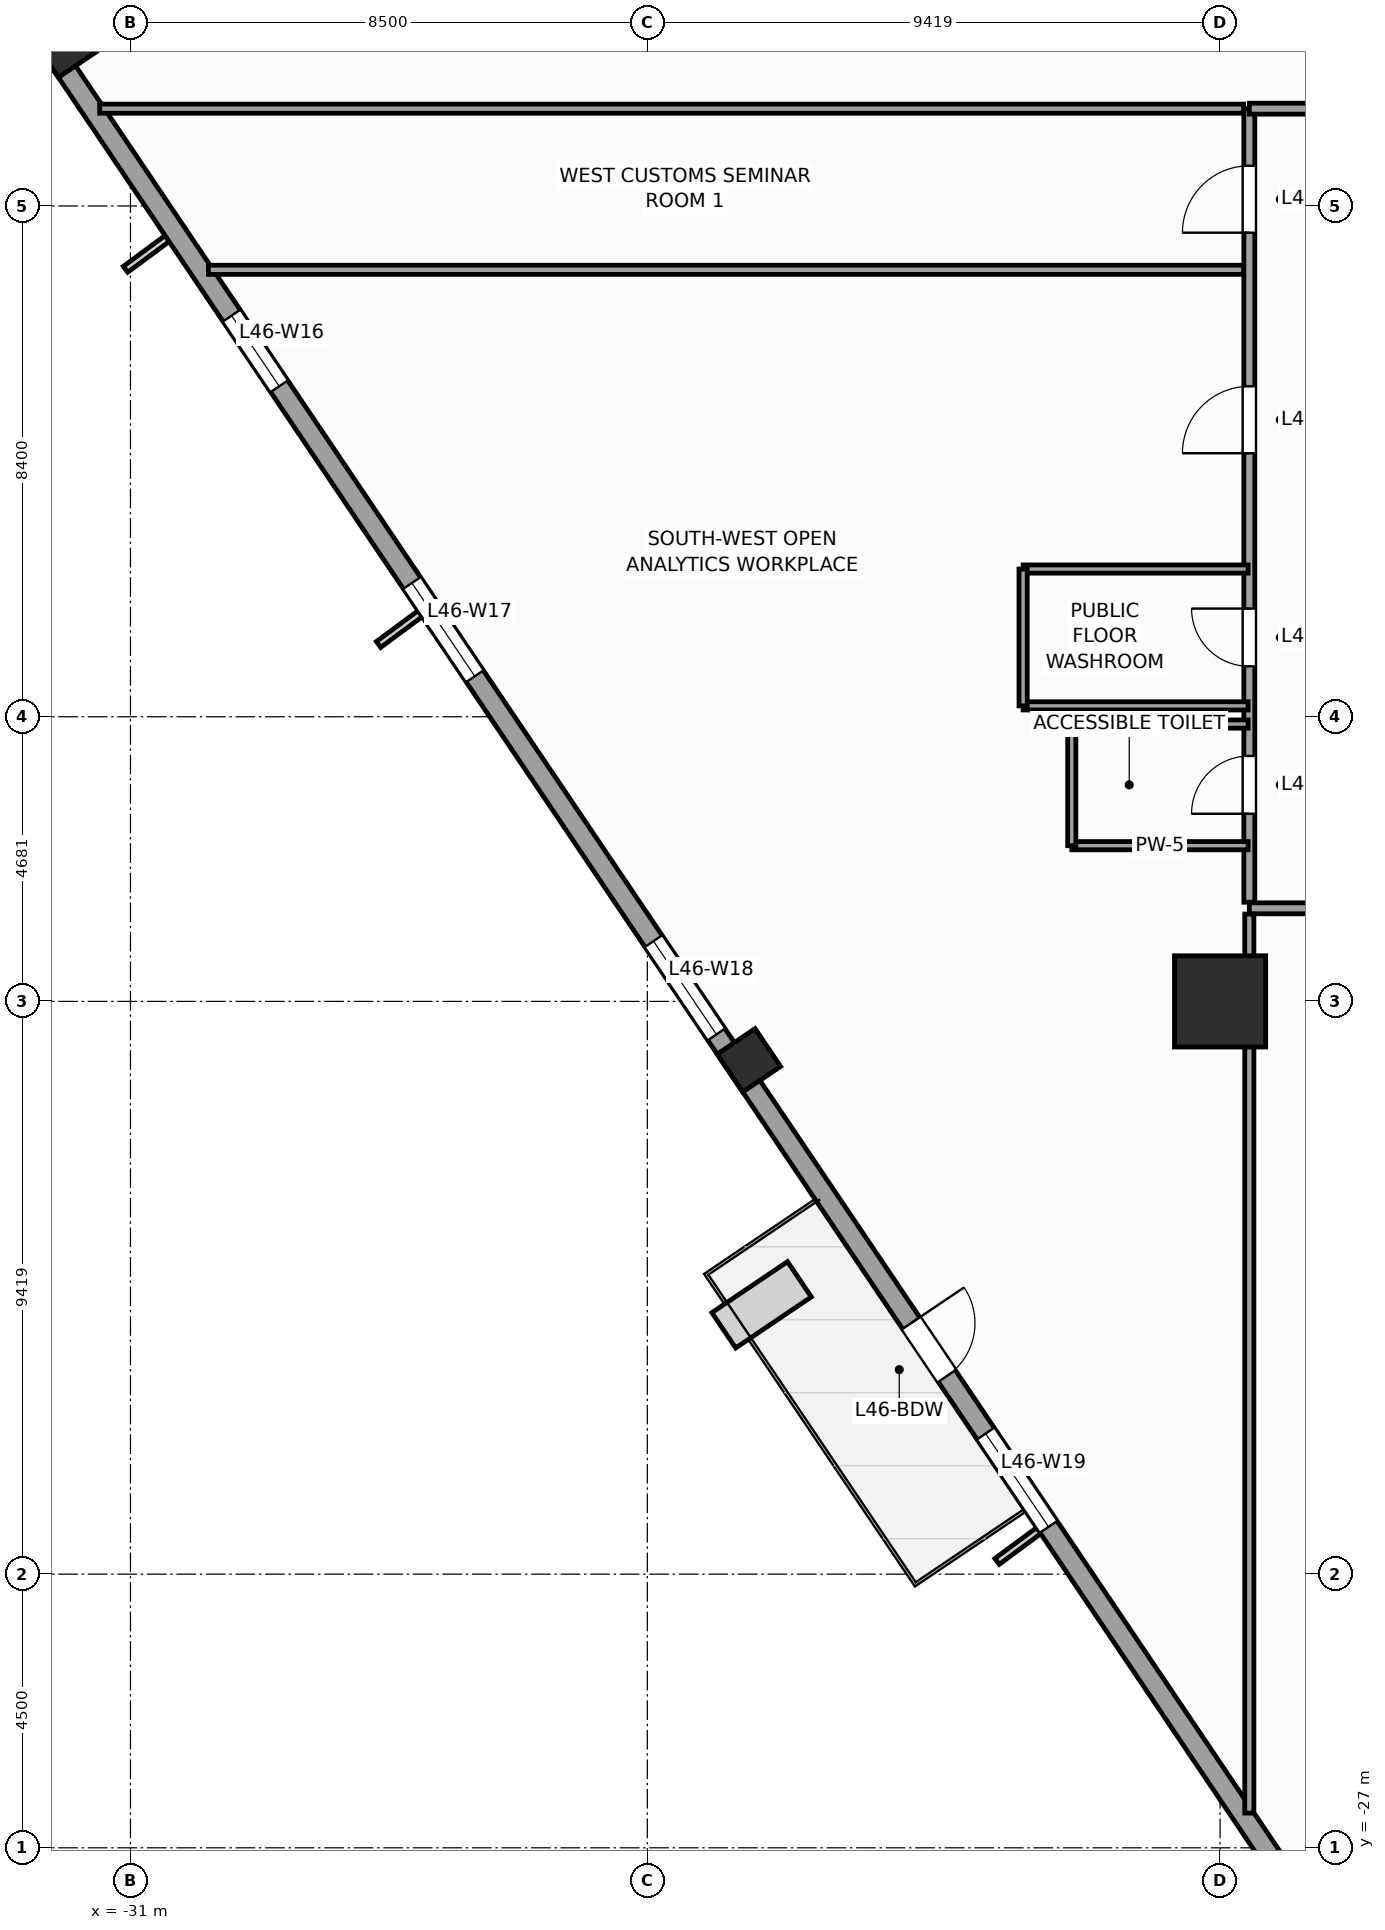
"""IFC4 building model, lengths in metres.
Left out: names, types, materials, properties, quantities, classifications, styles, units other than length and angle.
Written with IfcOpenShell. Run it as: python <this file> out.ifc"""

import sys

from ifc_helpers import new_model, si_unit, direction, frame, frame_2d, origin, origin_2d, place, context, subcontext, project, spatial, rectangle, extrude, source, transform, mapped, element, fill, save


model = new_model("IFC4")
c1 = context("Model", 3, precision=1e-05, world=origin(), true_north=direction((0.0, 1.0)))
c2 = subcontext(c1, "Body", "Model", "MODEL_VIEW")
j1 = project(units=[si_unit("LENGTHUNIT", "METRE"), si_unit("PLANEANGLEUNIT", "RADIAN")], contexts=[c1])
p1 = place(None, origin())
s1 = spatial("IfcSite", under=j1, at=p1, CompositionType="ELEMENT")
p2 = place(p1, origin())
s2 = spatial("IfcBuilding", under=s1, at=p2, CompositionType="ELEMENT")
p3 = place(p2, frame((0.0, 0.0, 192.4)))
s3 = spatial("IfcBuildingStorey", under=s2, at=p3, CompositionType="ELEMENT", Elevation=192.4)
m1 = source(origin(), c2, "Body", "SweptSolid", [
    extrude(rectangle(XDim=1.5, YDim=1.5, at=origin_2d()), origin(), (0.0, 0.0, 1.0), 4.0),
])
p4 = place(p3, frame((-13.081, -13.081, 0.0), z_axis=(0.0, 0.0, 1.0), x_axis=(1.0, 0.0, 0.0)))
e1 = element("IfcColumn", 1, at=p4, inside=s3, PredefinedType="COLUMN", context=c2, shape_type="MappedRepresentation", body=[
    mapped(m1, transform((0.0, 0.0, 0.0), scale=1.0)),
])
m2 = source(origin(), c2, "Body", "SweptSolid", [
    extrude(rectangle(XDim=0.75, YDim=0.75, at=origin_2d()), origin(), (0.0, 0.0, 1.0), 4.0),
])
for number, where, z_axis, x_axis in (
    (2, (-32.083, 2.635, 0.0), (0.0, 0.0, 1.0), (0.829, 0.559, 0.0)),
    (3, (-20.83, -14.05, 0.0), (0.0, 0.0, 1.0), (0.829, 0.559, 0.0)),
):
    element("IfcColumn", number, at=place(p3, frame(where, z_axis=z_axis, x_axis=x_axis)), inside=s3, PredefinedType="COLUMN", context=c2, shape_type="MappedRepresentation", body=[
        mapped(m2, transform((0.0, 0.0, 0.0), scale=1.0)),
    ])
p5 = place(p3, frame((-28.223, 5.486, 0.0), z_axis=(0.0, 0.0, 1.0), x_axis=(-0.82905227345, -0.559171107879, 0.0)))
e4 = element("IfcWall", 4, at=p5, inside=s3, PredefinedType="STANDARD", context=c2, shape_type="SweptSolid", body=[
    extrude(rectangle(XDim=5.17, YDim=0.34, at=frame_2d((2.585, 0.0))), origin(), (0.0, 0.0, 1.0), 3.04),
])
p6 = place(p5, frame((1.885, 0.0, 0.56)))
e5 = element("IfcOpeningElement", 5, at=p6, cuts=e4, PredefinedType="OPENING", context=c2, shape_type="SweptSolid", body=[
    extrude(rectangle(XDim=1.4, YDim=2.4, at=frame_2d((0.7, 1.2))), frame((0.0, 0.18, 0.0), z_axis=(0.0, -1.0, 0.0), x_axis=(1.0, 0.0, 0.0)), (0.0, 0.0, 1.0), 0.36),
])
p7 = place(p3, frame((-32.558, 2.972, 0.0), z_axis=(0.0, 0.0, 1.0), x_axis=(0.559194910251, -0.829036218961, 0.0)))
e6 = element("IfcWall", 6, at=p7, inside=s3, PredefinedType="STANDARD", context=c2, shape_type="SweptSolid", body=[
    extrude(rectangle(XDim=41.34, YDim=0.34, at=frame_2d((20.67, 0.0))), origin(), (0.0, 0.0, 1.0), 3.04),
])
p8 = place(p7, frame((25.745, 0.0, 0.0)))
e7 = element("IfcOpeningElement", 7, at=p8, cuts=e6, PredefinedType="OPENING", context=c2, shape_type="SweptSolid", body=[
    extrude(rectangle(XDim=1.05, YDim=2.25, at=frame_2d((0.525, 1.125))), frame((0.0, 0.18, 0.0), z_axis=(0.0, -1.0, 0.0), x_axis=(1.0, 0.0, 0.0)), (0.0, 0.0, 1.0), 0.36),
])
p9 = place(p7, frame((5.761, 0.0, 0.56)))
e8 = element("IfcOpeningElement", 8, at=p9, cuts=e6, PredefinedType="OPENING", context=c2, shape_type="SweptSolid", body=[
    extrude(rectangle(XDim=1.4, YDim=2.4, at=frame_2d((0.7, 1.2))), frame((0.0, 0.18, 0.0), z_axis=(0.0, -1.0, 0.0), x_axis=(1.0, 0.0, 0.0)), (0.0, 0.0, 1.0), 0.36),
])
p10 = place(p7, frame((11.064, 0.0, 0.61)))
e9 = element("IfcOpeningElement", 9, at=p10, cuts=e6, PredefinedType="OPENING", context=c2, shape_type="SweptSolid", body=[
    extrude(rectangle(XDim=1.85, YDim=2.35, at=frame_2d((0.925, 1.175))), frame((0.0, 0.18, 0.0), z_axis=(0.0, -1.0, 0.0), x_axis=(1.0, 0.0, 0.0)), (0.0, 0.0, 1.0), 0.36),
])
p11 = place(p7, frame((18.168, 0.0, 0.61)))
e10 = element("IfcOpeningElement", 10, at=p11, cuts=e6, PredefinedType="OPENING", context=c2, shape_type="SweptSolid", body=[
    extrude(rectangle(XDim=1.85, YDim=2.35, at=frame_2d((0.925, 1.175))), frame((0.0, 0.18, 0.0), z_axis=(0.0, -1.0, 0.0), x_axis=(1.0, 0.0, 0.0)), (0.0, 0.0, 1.0), 0.36),
])
p12 = place(p7, frame((27.936, 0.0, 0.61)))
e11 = element("IfcOpeningElement", 11, at=p12, cuts=e6, PredefinedType="OPENING", context=c2, shape_type="SweptSolid", body=[
    extrude(rectangle(XDim=1.85, YDim=2.35, at=frame_2d((0.925, 1.175))), frame((0.0, 0.18, 0.0), z_axis=(0.0, -1.0, 0.0), x_axis=(1.0, 0.0, 0.0)), (0.0, 0.0, 1.0), 0.36),
])
p13 = place(p7, frame((36.352, 0.0, 0.56)))
e12 = element("IfcOpeningElement", 12, at=p13, cuts=e6, PredefinedType="OPENING", context=c2, shape_type="SweptSolid", body=[
    extrude(rectangle(XDim=1.4, YDim=2.4, at=frame_2d((0.7, 1.2))), frame((0.0, 0.18, 0.0), z_axis=(0.0, -1.0, 0.0), x_axis=(1.0, 0.0, 0.0)), (0.0, 0.0, 1.0), 0.36),
])
p14 = place(p3, frame((-12.6, -11.55, 0.0), z_axis=(0.0, 0.0, 1.0), x_axis=(1.0, 0.0, 0.0)))
e13 = element("IfcWall", 13, at=p14, inside=s3, PredefinedType="PARTITIONING", context=c2, shape_type="SweptSolid", body=[
    extrude(rectangle(XDim=25.2, YDim=0.18, at=frame_2d((12.6, 0.0))), origin(), (0.0, 0.0, 1.0), 3.74),
])
p15 = place(p14, frame((3.165, 0.0, 0.0)))
e14 = element("IfcOpeningElement", 14, at=p15, cuts=e13, PredefinedType="OPENING", context=c2, shape_type="SweptSolid", body=[
    extrude(rectangle(XDim=1.1, YDim=2.2, at=frame_2d((0.55, 1.1))), frame((0.0, 0.1, 0.0), z_axis=(0.0, -1.0, 0.0), x_axis=(1.0, 0.0, 0.0)), (0.0, 0.0, 1.0), 0.2),
])
p16 = place(p14, frame((9.3, 0.0, 0.0)))
e15 = element("IfcOpeningElement", 15, at=p16, cuts=e13, PredefinedType="OPENING", context=c2, shape_type="SweptSolid", body=[
    extrude(rectangle(XDim=1.1, YDim=2.2, at=frame_2d((0.55, 1.1))), frame((0.0, 0.1, 0.0), z_axis=(0.0, -1.0, 0.0), x_axis=(1.0, 0.0, 0.0)), (0.0, 0.0, 1.0), 0.2),
])
p17 = place(p14, frame((14.8, 0.0, 0.0)))
e16 = element("IfcOpeningElement", 16, at=p17, cuts=e13, PredefinedType="OPENING", context=c2, shape_type="SweptSolid", body=[
    extrude(rectangle(XDim=1.1, YDim=2.2, at=frame_2d((0.55, 1.1))), frame((0.0, 0.1, 0.0), z_axis=(0.0, -1.0, 0.0), x_axis=(1.0, 0.0, 0.0)), (0.0, 0.0, 1.0), 0.2),
])
p18 = place(p14, frame((20.936, 0.0, 0.0)))
e17 = element("IfcOpeningElement", 17, at=p18, cuts=e13, PredefinedType="OPENING", context=c2, shape_type="SweptSolid", body=[
    extrude(rectangle(XDim=1.1, YDim=2.2, at=frame_2d((0.55, 1.1))), frame((0.0, 0.1, 0.0), z_axis=(0.0, -1.0, 0.0), x_axis=(1.0, 0.0, 0.0)), (0.0, 0.0, 1.0), 0.2),
])
p19 = place(p3, frame((-12.6, -11.45, 0.0), z_axis=(0.0, 0.0, 1.0), x_axis=(0.0, 1.0, 0.0)))
e18 = element("IfcWall", 18, at=p19, inside=s3, PredefinedType="PARTITIONING", context=c2, shape_type="SweptSolid", body=[
    extrude(rectangle(XDim=13.05, YDim=0.18, at=frame_2d((6.525, 0.0))), origin(), (0.0, 0.0, 1.0), 3.74),
])
p20 = place(p19, frame((1.455, 0.0, 0.0)))
e19 = element("IfcOpeningElement", 19, at=p20, cuts=e18, PredefinedType="OPENING", context=c2, shape_type="SweptSolid", body=[
    extrude(rectangle(XDim=0.95, YDim=2.1, at=frame_2d((0.475, 1.05))), frame((0.0, 0.1, 0.0), z_axis=(0.0, -1.0, 0.0), x_axis=(1.0, 0.0, 0.0)), (0.0, 0.0, 1.0), 0.2),
])
p21 = place(p19, frame((3.879, 0.0, 0.0)))
e20 = element("IfcOpeningElement", 20, at=p21, cuts=e18, PredefinedType="OPENING", context=c2, shape_type="SweptSolid", body=[
    extrude(rectangle(XDim=0.95, YDim=2.1, at=frame_2d((0.475, 1.05))), frame((0.0, 0.1, 0.0), z_axis=(0.0, -1.0, 0.0), x_axis=(1.0, 0.0, 0.0)), (0.0, 0.0, 1.0), 0.2),
])
p22 = place(p19, frame((11.01, 0.0, 0.0)))
e21 = element("IfcOpeningElement", 21, at=p22, cuts=e18, PredefinedType="OPENING", context=c2, shape_type="SweptSolid", body=[
    extrude(rectangle(XDim=1.1, YDim=2.2, at=frame_2d((0.55, 1.1))), frame((0.0, 0.1, 0.0), z_axis=(0.0, -1.0, 0.0), x_axis=(1.0, 0.0, 0.0)), (0.0, 0.0, 1.0), 0.2),
])
p23 = place(p19, frame((7.384, 0.0, 0.0)))
e22 = element("IfcOpeningElement", 22, at=p23, cuts=e18, PredefinedType="OPENING", context=c2, shape_type="SweptSolid", body=[
    extrude(rectangle(XDim=1.1, YDim=2.2, at=frame_2d((0.55, 1.1))), frame((0.0, 0.1, 0.0), z_axis=(0.0, -1.0, 0.0), x_axis=(1.0, 0.0, 0.0)), (0.0, 0.0, 1.0), 0.2),
])
p24 = place(p3, frame((-12.6, 1.6, 0.0), z_axis=(0.0, 0.0, 1.0), x_axis=(1.0, 0.0, 0.0)))
e23 = element("IfcWall", 23, at=p24, inside=s3, PredefinedType="PARTITIONING", context=c2, shape_type="SweptSolid", body=[
    extrude(rectangle(XDim=3.9, YDim=0.18, at=frame_2d((1.95, 0.0))), origin(), (0.0, 0.0, 1.0), 3.74),
])
p25 = place(p24, frame((1.4, 0.0, 0.0)))
e24 = element("IfcOpeningElement", 24, at=p25, cuts=e23, PredefinedType="OPENING", context=c2, shape_type="SweptSolid", body=[
    extrude(rectangle(XDim=1.1, YDim=2.2, at=frame_2d((0.55, 1.1))), frame((0.0, 0.1, 0.0), z_axis=(0.0, -1.0, 0.0), x_axis=(1.0, 0.0, 0.0)), (0.0, 0.0, 1.0), 0.2),
])
p26 = place(p3, frame((-29.719, -1.05, 0.0), z_axis=(0.0, 0.0, 1.0), x_axis=(1.0, 0.0, 0.0)))
e25 = element("IfcWall", 25, at=p26, inside=s3, PredefinedType="PARTITIONING", context=c2, shape_type="SweptSolid", body=[
    extrude(rectangle(XDim=17.023, YDim=0.15, at=frame_2d((8.512, 0.0))), origin(), (0.0, 0.0, 1.0), 3.74),
])
p27 = place(p3, frame((-31.506, 1.6, 0.0), z_axis=(0.0, 0.0, 1.0), x_axis=(1.0, 0.0, 0.0)))
e26 = element("IfcWall", 26, at=p27, inside=s3, PredefinedType="PARTITIONING", context=c2, shape_type="SweptSolid", body=[
    extrude(rectangle(XDim=18.811, YDim=0.15, at=frame_2d((9.406, 0.0))), origin(), (0.0, 0.0, 1.0), 3.74),
])
p28 = place(p3, frame((-12.6, -26.429, 0.0), z_axis=(0.0, 0.0, 1.0), x_axis=(0.0, 1.0, 0.0)))
e27 = element("IfcWall", 27, at=p28, inside=s3, PredefinedType="PARTITIONING", context=c2, shape_type="SweptSolid", body=[
    extrude(rectangle(XDim=14.784, YDim=0.15, at=frame_2d((7.392, 0.0))), origin(), (0.0, 0.0, 1.0), 3.04),
])
for number, where, z_axis, x_axis in (
    (28, (-15.52, -10.52, 0.0), (0.0, 0.0, 1.0), (1.0, 0.0, 0.0)),
    (29, (-15.52, -8.52, 0.0), (0.0, 0.0, 1.0), (1.0, 0.0, 0.0)),
):
    element("IfcWall", number, at=place(p3, frame(where, z_axis=z_axis, x_axis=x_axis)), inside=s3, PredefinedType="PARTITIONING", context=c2, shape_type="SweptSolid", body=[
        extrude(rectangle(XDim=2.9, YDim=0.135, at=frame_2d((1.45, 0.0))), origin(), (0.0, 0.0, 1.0), 3.74),
    ])
p29 = place(p3, frame((-15.52, -10.52, 0.0), z_axis=(0.0, 0.0, 1.0), x_axis=(0.0, 1.0, 0.0)))
e30 = element("IfcWall", 30, at=p29, inside=s3, PredefinedType="PARTITIONING", context=c2, shape_type="SweptSolid", body=[
    extrude(rectangle(XDim=2.0, YDim=0.135, at=frame_2d((1.0, 0.0))), origin(), (0.0, 0.0, 1.0), 3.74),
])
for number, where, z_axis, x_axis in (
    (31, (-16.32, -8.221, 0.0), (0.0, 0.0, 1.0), (1.0, 0.0, 0.0)),
    (32, (-16.32, -5.971, 0.0), (0.0, 0.0, 1.0), (1.0, 0.0, 0.0)),
):
    element("IfcWall", number, at=place(p3, frame(where, z_axis=z_axis, x_axis=x_axis)), inside=s3, PredefinedType="PARTITIONING", context=c2, shape_type="SweptSolid", body=[
        extrude(rectangle(XDim=3.7, YDim=0.135, at=frame_2d((1.85, 0.0))), origin(), (0.0, 0.0, 1.0), 3.74),
    ])
p30 = place(p3, frame((-16.32, -8.221, 0.0), z_axis=(0.0, 0.0, 1.0), x_axis=(0.0, 1.0, 0.0)))
e33 = element("IfcWall", 33, at=p30, inside=s3, PredefinedType="PARTITIONING", context=c2, shape_type="SweptSolid", body=[
    extrude(rectangle(XDim=2.25, YDim=0.135, at=frame_2d((1.125, 0.0))), origin(), (0.0, 0.0, 1.0), 3.74),
])
m3 = source(origin(), c2, "Body", "SweptSolid", [
    extrude(rectangle(XDim=1.05, YDim=2.25, at=frame_2d((0.525, 1.125))), frame((0.0, 0.025, 0.0), z_axis=(0.0, -1.0, 0.0), x_axis=(1.0, 0.0, 0.0)), (0.0, 0.0, 1.0), 0.05),
])
p31 = place(p8, origin())
e34 = element("IfcDoor", 34, at=p31, inside=s3, OperationType="SINGLE_SWING_LEFT", PredefinedType="DOOR", context=c2, shape_type="MappedRepresentation", body=[
    mapped(m3, transform((0.0, 0.0, 0.0), scale=1.0)),
])
fill(e7, e34)
m4 = source(origin(), c2, "Body", "SweptSolid", [
    extrude(rectangle(XDim=1.4, YDim=2.4, at=frame_2d((0.7, 1.2))), frame((0.0, 0.03, 0.0), z_axis=(0.0, -1.0, 0.0), x_axis=(1.0, 0.0, 0.0)), (0.0, 0.0, 1.0), 0.06),
])
p32 = place(p9, origin())
e35 = element("IfcWindow", 35, at=p32, inside=s3, PartitioningType="SINGLE_PANEL", PredefinedType="WINDOW", context=c2, shape_type="MappedRepresentation", body=[
    mapped(m4, transform((0.0, 0.0, 0.0), scale=1.0)),
])
fill(e8, e35)
m5 = source(origin(), c2, "Body", "SweptSolid", [
    extrude(rectangle(XDim=1.85, YDim=2.35, at=frame_2d((0.925, 1.175))), frame((0.0, 0.03, 0.0), z_axis=(0.0, -1.0, 0.0), x_axis=(1.0, 0.0, 0.0)), (0.0, 0.0, 1.0), 0.06),
])
p33 = place(p10, origin())
e36 = element("IfcWindow", 36, at=p33, inside=s3, PartitioningType="SINGLE_PANEL", PredefinedType="WINDOW", context=c2, shape_type="MappedRepresentation", body=[
    mapped(m5, transform((0.0, 0.0, 0.0), scale=1.0)),
])
fill(e9, e36)
p34 = place(p11, origin())
e37 = element("IfcWindow", 37, at=p34, inside=s3, PartitioningType="SINGLE_PANEL", PredefinedType="WINDOW", context=c2, shape_type="MappedRepresentation", body=[
    mapped(m5, transform((0.0, 0.0, 0.0), scale=1.0)),
])
fill(e10, e37)
p35 = place(p12, origin())
e38 = element("IfcWindow", 38, at=p35, inside=s3, PartitioningType="SINGLE_PANEL", PredefinedType="WINDOW", context=c2, shape_type="MappedRepresentation", body=[
    mapped(m5, transform((0.0, 0.0, 0.0), scale=1.0)),
])
fill(e11, e38)
m6 = source(origin(), c2, "Body", "SweptSolid", [
    extrude(rectangle(XDim=0.95, YDim=2.1, at=frame_2d((0.475, 1.05))), frame((0.0, 0.025, 0.0), z_axis=(0.0, -1.0, 0.0), x_axis=(1.0, 0.0, 0.0)), (0.0, 0.0, 1.0), 0.05),
])
p36 = place(p20, origin())
e39 = element("IfcDoor", 39, at=p36, inside=s3, OperationType="SINGLE_SWING_LEFT", PredefinedType="DOOR", context=c2, shape_type="MappedRepresentation", body=[
    mapped(m6, transform((0.0, 0.0, 0.0), scale=1.0)),
])
fill(e19, e39)
p37 = place(p21, origin())
e40 = element("IfcDoor", 40, at=p37, inside=s3, OperationType="SINGLE_SWING_RIGHT", PredefinedType="DOOR", context=c2, shape_type="MappedRepresentation", body=[
    mapped(m6, transform((0.0, 0.0, 0.0), scale=1.0)),
])
fill(e20, e40)
m7 = source(origin(), c2, "Body", "SweptSolid", [
    extrude(rectangle(XDim=1.1, YDim=2.2, at=frame_2d((0.55, 1.1))), frame((0.0, 0.025, 0.0), z_axis=(0.0, -1.0, 0.0), x_axis=(1.0, 0.0, 0.0)), (0.0, 0.0, 1.0), 0.05),
])
p38 = place(p22, origin())
e41 = element("IfcDoor", 41, at=p38, inside=s3, OperationType="SINGLE_SWING_LEFT", PredefinedType="DOOR", context=c2, shape_type="MappedRepresentation", body=[
    mapped(m7, transform((0.0, 0.0, 0.0), scale=1.0)),
])
fill(e21, e41)
p39 = place(p23, origin())
e42 = element("IfcDoor", 42, at=p39, inside=s3, OperationType="SINGLE_SWING_LEFT", PredefinedType="DOOR", context=c2, shape_type="MappedRepresentation", body=[
    mapped(m7, transform((0.0, 0.0, 0.0), scale=1.0)),
])
fill(e22, e42)
save(model, sys.argv[1])
